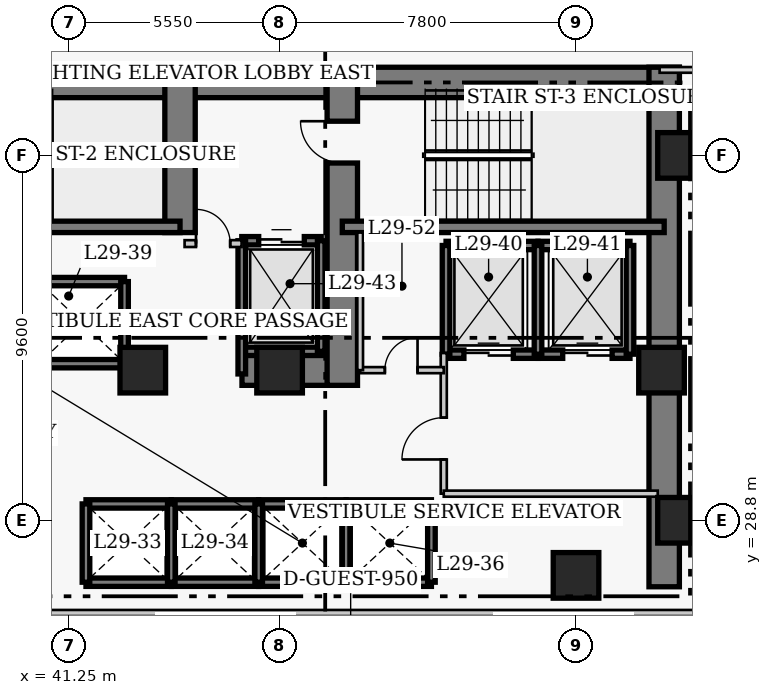
"""IFC4 building model, lengths in metres.
Left out: names, types, materials, properties, quantities, classifications, styles, units other than length and angle.
Written with IfcOpenShell. Run it as: python <this file> out.ifc"""

import sys

from ifc_helpers import new_model, si_unit, direction, frame, frame_2d, origin, origin_2d, place, context, subcontext, project, spatial, rectangle, extrude, element, fill, save


model = new_model("IFC4")
c1 = context("Model", 3, precision=1e-05, world=origin(), true_north=direction((0.0, 1.0)))
c2 = subcontext(c1, "Body", "Model", "MODEL_VIEW")
j1 = project(units=[si_unit("LENGTHUNIT", "METRE"), si_unit("PLANEANGLEUNIT", "RADIAN")], contexts=[c1])
p1 = place(None, origin())
s1 = spatial("IfcSite", under=j1, at=p1, CompositionType="ELEMENT")
p2 = place(p1, origin())
s2 = spatial("IfcBuilding", under=s1, at=p2, CompositionType="ELEMENT")
p3 = place(p2, frame((0.0, 0.0, 118.4)))
s3 = spatial("IfcBuildingStorey", under=s2, at=p3, CompositionType="ELEMENT", Elevation=118.4)
p4 = place(p3, frame((35.85, 40.32, 0.0), z_axis=(0.0, 0.0, 1.0), x_axis=(1.0, 0.0, 0.0)))
e1 = element("IfcWall", 1, at=p4, inside=s3, PredefinedType="SHEAR", context=c2, shape_type="SweptSolid", body=[
    extrude(rectangle(XDim=12.6, YDim=0.8, at=frame_2d((6.3, 0.0))), origin(), (0.0, 0.0, 1.0), 3.8),
])
p5 = place(p3, frame((48.45, 40.32, 0.0), z_axis=(0.0, 0.0, 1.0), x_axis=(1.0, 0.0, 0.0)))
e2 = element("IfcWall", 2, at=p5, inside=s3, PredefinedType="SHEAR", context=c2, shape_type="SweptSolid", body=[
    extrude(rectangle(XDim=8.87, YDim=0.8, at=frame_2d((4.435, 0.0))), origin(), (0.0, 0.0, 1.0), 3.8),
])
p6 = place(p3, frame((56.92, 27.05, 0.0), z_axis=(0.0, 0.0, 1.0), x_axis=(0.0, 1.0, 0.0)))
e3 = element("IfcWall", 3, at=p6, inside=s3, PredefinedType="SHEAR", context=c2, shape_type="SweptSolid", body=[
    extrude(rectangle(XDim=13.67, YDim=0.8, at=frame_2d((6.835, 0.0))), origin(), (0.0, 0.0, 1.0), 3.8),
])
p7 = place(p3, frame((45.81, 32.75, 0.0), z_axis=(0.0, 0.0, 1.0), x_axis=(1.0, 0.0, 0.0)))
e4 = element("IfcWall", 4, at=p7, inside=s3, PredefinedType="SHEAR", context=c2, shape_type="SweptSolid", body=[
    extrude(rectangle(XDim=2.64, YDim=0.8, at=frame_2d((1.32, 0.0))), origin(), (0.0, 0.0, 1.0), 3.8),
])
p8 = place(p3, frame((44.18, 36.37, 0.0), z_axis=(0.0, 0.0, 1.0), x_axis=(0.0, 1.0, 0.0)))
e5 = element("IfcWall", 5, at=p8, inside=s3, PredefinedType="SHEAR", context=c2, shape_type="SweptSolid", body=[
    extrude(rectangle(XDim=3.95, YDim=0.8, at=frame_2d((1.975, 0.0))), origin(), (0.0, 0.0, 1.0), 3.8),
])
p9 = place(p3, frame((48.45, 32.35, 0.0), z_axis=(0.0, 0.0, 1.0), x_axis=(0.0, 1.0, 0.0)))
e6 = element("IfcWall", 6, at=p9, inside=s3, PredefinedType="SHEAR", context=c2, shape_type="SweptSolid", body=[
    extrude(rectangle(XDim=7.97, YDim=0.8, at=frame_2d((3.985, 0.0))), origin(), (0.0, 0.0, 1.0), 3.8),
])
p10 = place(p9, frame((5.85, 0.0, 0.0)))
e7 = element("IfcOpeningElement", 7, at=p10, cuts=e6, PredefinedType="OPENING", context=c2, shape_type="SweptSolid", body=[
    extrude(rectangle(XDim=1.1, YDim=2.15, at=frame_2d((0.55, 1.075))), frame((0.0, 0.41, 0.0), z_axis=(0.0, -1.0, 0.0), x_axis=(1.0, 0.0, 0.0)), (0.0, 0.0, 1.0), 0.82),
])
p11 = place(p3, frame((35.85, 36.52, 0.0), z_axis=(0.0, 0.0, 1.0), x_axis=(1.0, 0.0, 0.0)))
e8 = element("IfcWall", 8, at=p11, inside=s3, PredefinedType="SHEAR", context=c2, shape_type="SweptSolid", body=[
    extrude(rectangle(XDim=8.33, YDim=0.3, at=frame_2d((4.165, 0.0))), origin(), (0.0, 0.0, 1.0), 3.8),
])
p12 = place(p3, frame((48.45, 36.52, 0.0), z_axis=(0.0, 0.0, 1.0), x_axis=(1.0, 0.0, 0.0)))
e9 = element("IfcWall", 9, at=p12, inside=s3, PredefinedType="SHEAR", context=c2, shape_type="SweptSolid", body=[
    extrude(rectangle(XDim=8.47, YDim=0.3, at=frame_2d((4.235, 0.0))), origin(), (0.0, 0.0, 1.0), 3.8),
])
for number, where, z_axis, x_axis in (
    (10, (57.35, 28.8, 0.0), (0.0, 0.0, 1.0), (1.0, 0.0, 0.0)),
    (11, (57.35, 38.4, 0.0), (0.0, 0.0, 1.0), (1.0, 0.0, 0.0)),
    (12, (43.2, 32.75, 0.0), (0.0, 0.0, 1.0), (1.0, 0.0, 0.0)),
    (13, (46.8, 32.75, 0.0), (0.0, 0.0, 1.0), (1.0, 0.0, 0.0)),
    (14, (54.6, 27.35, 0.0), (0.0, 0.0, 1.0), (1.0, 0.0, 0.0)),
    (15, (56.85, 32.75, 0.0), (0.0, 0.0, 1.0), (1.0, 0.0, 0.0)),
):
    element("IfcColumn", number, at=place(p3, frame(where, z_axis=z_axis, x_axis=x_axis)), inside=s3, PredefinedType="COLUMN", context=c2, shape_type="SweptSolid", body=[
        extrude(rectangle(XDim=1.2, YDim=1.2, at=origin_2d()), origin(), (0.0, 0.0, 1.0), 3.8),
    ])
for number, where, z_axis, x_axis in (
    (16, (41.705, 29.23, 0.0), (0.0, 0.0, 1.0), (1.0, 0.0, 0.0)),
    (17, (41.705, 27.17, 0.0), (0.0, 0.0, 1.0), (1.0, 0.0, 0.0)),
):
    element("IfcWall", number, at=place(p3, frame(where, z_axis=z_axis, x_axis=x_axis)), inside=s3, PredefinedType="SHEAR", context=c2, shape_type="SweptSolid", body=[
        extrude(rectangle(XDim=2.245, YDim=0.22, at=frame_2d((1.123, 0.0))), origin(), (0.0, 0.0, 1.0), 3.8),
    ])
p13 = place(p3, frame((41.705, 27.17, 0.0), z_axis=(0.0, 0.0, 1.0), x_axis=(0.0, 1.0, 0.0)))
e18 = element("IfcWall", 18, at=p13, inside=s3, PredefinedType="SHEAR", context=c2, shape_type="SweptSolid", body=[
    extrude(rectangle(XDim=2.06, YDim=0.2, at=frame_2d((1.03, 0.0))), origin(), (0.0, 0.0, 1.0), 3.8),
])
for number, where, z_axis, x_axis in (
    (19, (43.95, 29.23, 0.0), (0.0, 0.0, 1.0), (1.0, 0.0, 0.0)),
    (20, (43.95, 27.17, 0.0), (0.0, 0.0, 1.0), (1.0, 0.0, 0.0)),
):
    element("IfcWall", number, at=place(p3, frame(where, z_axis=z_axis, x_axis=x_axis)), inside=s3, PredefinedType="SHEAR", context=c2, shape_type="SweptSolid", body=[
        extrude(rectangle(XDim=2.3, YDim=0.22, at=frame_2d((1.15, 0.0))), origin(), (0.0, 0.0, 1.0), 3.8),
    ])
p14 = place(p3, frame((43.95, 27.17, 0.0), z_axis=(0.0, 0.0, 1.0), x_axis=(0.0, 1.0, 0.0)))
e21 = element("IfcWall", 21, at=p14, inside=s3, PredefinedType="SHEAR", context=c2, shape_type="SweptSolid", body=[
    extrude(rectangle(XDim=2.06, YDim=0.2, at=frame_2d((1.03, 0.0))), origin(), (0.0, 0.0, 1.0), 3.8),
])
for number, where, z_axis, x_axis in (
    (22, (46.25, 29.23, 0.0), (0.0, 0.0, 1.0), (1.0, 0.0, 0.0)),
    (23, (46.25, 27.17, 0.0), (0.0, 0.0, 1.0), (1.0, 0.0, 0.0)),
):
    element("IfcWall", number, at=place(p3, frame(where, z_axis=z_axis, x_axis=x_axis)), inside=s3, PredefinedType="SHEAR", context=c2, shape_type="SweptSolid", body=[
        extrude(rectangle(XDim=2.3, YDim=0.22, at=frame_2d((1.15, 0.0))), origin(), (0.0, 0.0, 1.0), 3.8),
    ])
p15 = place(p3, frame((46.25, 27.17, 0.0), z_axis=(0.0, 0.0, 1.0), x_axis=(0.0, 1.0, 0.0)))
e24 = element("IfcWall", 24, at=p15, inside=s3, PredefinedType="SHEAR", context=c2, shape_type="SweptSolid", body=[
    extrude(rectangle(XDim=2.06, YDim=0.2, at=frame_2d((1.03, 0.0))), origin(), (0.0, 0.0, 1.0), 3.8),
])
for number, where, z_axis, x_axis in (
    (25, (48.55, 29.23, 0.0), (0.0, 0.0, 1.0), (1.0, 0.0, 0.0)),
    (26, (48.55, 27.17, 0.0), (0.0, 0.0, 1.0), (1.0, 0.0, 0.0)),
):
    element("IfcWall", number, at=place(p3, frame(where, z_axis=z_axis, x_axis=x_axis)), inside=s3, PredefinedType="SHEAR", context=c2, shape_type="SweptSolid", body=[
        extrude(rectangle(XDim=2.245, YDim=0.22, at=frame_2d((1.123, 0.0))), origin(), (0.0, 0.0, 1.0), 3.8),
    ])
for number, where, z_axis, x_axis in (
    (27, (48.55, 27.17, 0.0), (0.0, 0.0, 1.0), (0.0, 1.0, 0.0)),
    (28, (50.795, 27.17, 0.0), (0.0, 0.0, 1.0), (0.0, 1.0, 0.0)),
):
    element("IfcWall", number, at=place(p3, frame(where, z_axis=z_axis, x_axis=x_axis)), inside=s3, PredefinedType="SHEAR", context=c2, shape_type="SweptSolid", body=[
        extrude(rectangle(XDim=2.06, YDim=0.2, at=frame_2d((1.03, 0.0))), origin(), (0.0, 0.0, 1.0), 3.8),
    ])
for number, where, z_axis, x_axis in (
    (29, (40.4, 35.08, 0.0), (0.0, 0.0, 1.0), (1.0, 0.0, 0.0)),
    (30, (40.4, 32.92, 0.0), (0.0, 0.0, 1.0), (1.0, 0.0, 0.0)),
):
    element("IfcWall", number, at=place(p3, frame(where, z_axis=z_axis, x_axis=x_axis)), inside=s3, PredefinedType="SHEAR", context=c2, shape_type="SweptSolid", body=[
        extrude(rectangle(XDim=2.32, YDim=0.22, at=frame_2d((1.16, 0.0))), origin(), (0.0, 0.0, 1.0), 3.8),
    ])
p16 = place(p3, frame((42.72, 32.92, 0.0), z_axis=(0.0, 0.0, 1.0), x_axis=(0.0, 1.0, 0.0)))
e31 = element("IfcWall", 31, at=p16, inside=s3, PredefinedType="SHEAR", context=c2, shape_type="SweptSolid", body=[
    extrude(rectangle(XDim=2.16, YDim=0.2, at=frame_2d((1.08, 0.0))), origin(), (0.0, 0.0, 1.0), 3.8),
])
p17 = place(p3, frame((51.18, 36.03, 0.0), z_axis=(0.0, 0.0, 1.0), x_axis=(1.0, 0.0, 0.0)))
e32 = element("IfcWall", 32, at=p17, inside=s3, PredefinedType="SHEAR", context=c2, shape_type="SweptSolid", body=[
    extrude(rectangle(XDim=2.42, YDim=0.22, at=frame_2d((1.21, 0.0))), origin(), (0.0, 0.0, 1.0), 3.8),
])
p18 = place(p3, frame((51.18, 33.17, 0.0), z_axis=(0.0, 0.0, 1.0), x_axis=(1.0, 0.0, 0.0)))
e33 = element("IfcWall", 33, at=p18, inside=s3, PredefinedType="SHEAR", context=c2, shape_type="SweptSolid", body=[
    extrude(rectangle(XDim=2.42, YDim=0.22, at=frame_2d((1.21, 0.0))), origin(), (0.0, 0.0, 1.0), 3.8),
])
p19 = place(p18, frame((0.47, 0.0, 0.0)))
e34 = element("IfcOpeningElement", 34, at=p19, cuts=e33, PredefinedType="OPENING", context=c2, shape_type="SweptSolid", body=[
    extrude(rectangle(XDim=1.3, YDim=2.15, at=frame_2d((0.65, 1.075))), frame((0.0, 0.12, 0.0), z_axis=(0.0, -1.0, 0.0), x_axis=(1.0, 0.0, 0.0)), (0.0, 0.0, 1.0), 0.24),
])
p20 = place(p3, frame((51.18, 33.17, 0.0), z_axis=(0.0, 0.0, 1.0), x_axis=(0.0, 1.0, 0.0)))
e35 = element("IfcWall", 35, at=p20, inside=s3, PredefinedType="SHEAR", context=c2, shape_type="SweptSolid", body=[
    extrude(rectangle(XDim=2.86, YDim=0.2, at=frame_2d((1.43, 0.0))), origin(), (0.0, 0.0, 1.0), 3.8),
])
p21 = place(p3, frame((53.6, 36.03, 0.0), z_axis=(0.0, 0.0, 1.0), x_axis=(1.0, 0.0, 0.0)))
e36 = element("IfcWall", 36, at=p21, inside=s3, PredefinedType="SHEAR", context=c2, shape_type="SweptSolid", body=[
    extrude(rectangle(XDim=2.42, YDim=0.22, at=frame_2d((1.21, 0.0))), origin(), (0.0, 0.0, 1.0), 3.8),
])
p22 = place(p3, frame((53.6, 33.17, 0.0), z_axis=(0.0, 0.0, 1.0), x_axis=(1.0, 0.0, 0.0)))
e37 = element("IfcWall", 37, at=p22, inside=s3, PredefinedType="SHEAR", context=c2, shape_type="SweptSolid", body=[
    extrude(rectangle(XDim=2.42, YDim=0.22, at=frame_2d((1.21, 0.0))), origin(), (0.0, 0.0, 1.0), 3.8),
])
p23 = place(p22, frame((0.65, 0.0, 0.0)))
e38 = element("IfcOpeningElement", 38, at=p23, cuts=e37, PredefinedType="OPENING", context=c2, shape_type="SweptSolid", body=[
    extrude(rectangle(XDim=1.3, YDim=2.15, at=frame_2d((0.65, 1.075))), frame((0.0, 0.12, 0.0), z_axis=(0.0, -1.0, 0.0), x_axis=(1.0, 0.0, 0.0)), (0.0, 0.0, 1.0), 0.24),
])
for number, where, z_axis, x_axis in (
    (39, (53.6, 33.17, 0.0), (0.0, 0.0, 1.0), (0.0, 1.0, 0.0)),
    (40, (56.02, 33.17, 0.0), (0.0, 0.0, 1.0), (0.0, 1.0, 0.0)),
):
    element("IfcWall", number, at=place(p3, frame(where, z_axis=z_axis, x_axis=x_axis)), inside=s3, PredefinedType="SHEAR", context=c2, shape_type="SweptSolid", body=[
        extrude(rectangle(XDim=2.86, YDim=0.2, at=frame_2d((1.43, 0.0))), origin(), (0.0, 0.0, 1.0), 3.8),
    ])
p24 = place(p3, frame((45.805, 36.155, 0.0), z_axis=(0.0, 0.0, 1.0), x_axis=(1.0, 0.0, 0.0)))
e41 = element("IfcWall", 41, at=p24, inside=s3, PredefinedType="SHEAR", context=c2, shape_type="SweptSolid", body=[
    extrude(rectangle(XDim=2.09, YDim=0.22, at=frame_2d((1.045, 0.0))), origin(), (0.0, 0.0, 1.0), 3.8),
])
p25 = place(p24, frame((0.445, 0.0, 0.0)))
e42 = element("IfcOpeningElement", 42, at=p25, cuts=e41, PredefinedType="OPENING", context=c2, shape_type="SweptSolid", body=[
    extrude(rectangle(XDim=1.2, YDim=2.15, at=frame_2d((0.6, 1.075))), frame((0.0, 0.12, 0.0), z_axis=(0.0, -1.0, 0.0), x_axis=(1.0, 0.0, 0.0)), (0.0, 0.0, 1.0), 0.24),
])
p26 = place(p3, frame((45.805, 33.245, 0.0), z_axis=(0.0, 0.0, 1.0), x_axis=(1.0, 0.0, 0.0)))
e43 = element("IfcWall", 43, at=p26, inside=s3, PredefinedType="SHEAR", context=c2, shape_type="SweptSolid", body=[
    extrude(rectangle(XDim=2.09, YDim=0.22, at=frame_2d((1.045, 0.0))), origin(), (0.0, 0.0, 1.0), 3.8),
])
p27 = place(p3, frame((45.805, 32.65, 0.0), z_axis=(0.0, 0.0, 1.0), x_axis=(0.0, 1.0, 0.0)))
e44 = element("IfcWall", 44, at=p27, inside=s3, PredefinedType="SHEAR", context=c2, shape_type="SweptSolid", body=[
    extrude(rectangle(XDim=3.505, YDim=0.2, at=frame_2d((1.752, 0.0))), origin(), (0.0, 0.0, 1.0), 3.8),
])
p28 = place(p3, frame((47.895, 33.245, 0.0), z_axis=(0.0, 0.0, 1.0), x_axis=(0.0, 1.0, 0.0)))
e45 = element("IfcWall", 45, at=p28, inside=s3, PredefinedType="SHEAR", context=c2, shape_type="SweptSolid", body=[
    extrude(rectangle(XDim=2.91, YDim=0.2, at=frame_2d((1.455, 0.0))), origin(), (0.0, 0.0, 1.0), 3.8),
])
p29 = place(p3, frame((44.3, 36.08, 0.0), z_axis=(0.0, 0.0, 1.0), x_axis=(1.0, 0.0, 0.0)))
e46 = element("IfcWall", 46, at=p29, inside=s3, PredefinedType="PARTITIONING", context=c2, shape_type="SweptSolid", body=[
    extrude(rectangle(XDim=1.5, YDim=0.18, at=frame_2d((0.75, 0.0))), origin(), (0.0, 0.0, 1.0), 3.54),
])
p30 = place(p29, frame((0.3, 0.0, 0.0)))
e47 = element("IfcOpeningElement", 47, at=p30, cuts=e46, PredefinedType="OPENING", context=c2, shape_type="SweptSolid", body=[
    extrude(rectangle(XDim=0.9, YDim=2.15, at=frame_2d((0.45, 1.075))), frame((0.0, 0.1, 0.0), z_axis=(0.0, -1.0, 0.0), x_axis=(1.0, 0.0, 0.0)), (0.0, 0.0, 1.0), 0.2),
])
p31 = place(p3, frame((51.12, 29.5, 0.0), z_axis=(0.0, 0.0, 1.0), x_axis=(0.0, 1.0, 0.0)))
e48 = element("IfcWall", 48, at=p31, inside=s3, PredefinedType="PARTITIONING", context=c2, shape_type="SweptSolid", body=[
    extrude(rectangle(XDim=3.7, YDim=0.16, at=frame_2d((1.85, 0.0))), origin(), (0.0, 0.0, 1.0), 3.54),
])
p32 = place(p31, frame((0.9, 0.0, 0.0)))
e49 = element("IfcOpeningElement", 49, at=p32, cuts=e48, PredefinedType="OPENING", context=c2, shape_type="SweptSolid", body=[
    extrude(rectangle(XDim=1.1, YDim=2.15, at=frame_2d((0.55, 1.075))), frame((0.0, 0.09, 0.0), z_axis=(0.0, -1.0, 0.0), x_axis=(1.0, 0.0, 0.0)), (0.0, 0.0, 1.0), 0.18),
])
p33 = place(p3, frame((51.12, 29.5, 0.0), z_axis=(0.0, 0.0, 1.0), x_axis=(1.0, 0.0, 0.0)))
e50 = element("IfcWall", 50, at=p33, inside=s3, PredefinedType="PARTITIONING", context=c2, shape_type="SweptSolid", body=[
    extrude(rectangle(XDim=5.63, YDim=0.16, at=frame_2d((2.815, 0.0))), origin(), (0.0, 0.0, 1.0), 3.54),
])
p34 = place(p3, frame((48.92, 32.75, 0.0), z_axis=(0.0, 0.0, 1.0), x_axis=(1.0, 0.0, 0.0)))
e51 = element("IfcWall", 51, at=p34, inside=s3, PredefinedType="PARTITIONING", context=c2, shape_type="SweptSolid", body=[
    extrude(rectangle(XDim=2.2, YDim=0.16, at=frame_2d((1.1, 0.0))), origin(), (0.0, 0.0, 1.0), 3.54),
])
p35 = place(p34, frame((0.65, 0.0, 0.0)))
e52 = element("IfcOpeningElement", 52, at=p35, cuts=e51, PredefinedType="OPENING", context=c2, shape_type="SweptSolid", body=[
    extrude(rectangle(XDim=0.86, YDim=2.05, at=frame_2d((0.43, 1.025))), frame((0.0, 0.09, 0.0), z_axis=(0.0, -1.0, 0.0), x_axis=(1.0, 0.0, 0.0)), (0.0, 0.0, 1.0), 0.18),
])
p36 = place(p3, frame((48.92, 32.75, 0.0), z_axis=(0.0, 0.0, 1.0), x_axis=(0.0, 1.0, 0.0)))
e53 = element("IfcWall", 53, at=p36, inside=s3, PredefinedType="PARTITIONING", context=c2, shape_type="SweptSolid", body=[
    extrude(rectangle(XDim=3.62, YDim=0.15, at=frame_2d((1.81, 0.0))), origin(), (0.0, 0.0, 1.0), 3.54),
])
p37 = place(p3, frame((35.85, 26.36, 0.0), z_axis=(0.0, 0.0, 1.0), x_axis=(1.0, 0.0, 0.0)))
e54 = element("IfcWall", 54, at=p37, inside=s3, PredefinedType="PARTITIONING", context=c2, shape_type="SweptSolid", body=[
    extrude(rectangle(XDim=22.45, YDim=0.16, at=frame_2d((11.225, 0.0))), origin(), (0.0, 0.0, 1.0), 3.54),
])
p38 = place(p3, frame((56.8, 40.65, 0.0), z_axis=(0.0, 0.0, 1.0), x_axis=(1.0, 0.0, 0.0)))
e55 = element("IfcWall", 55, at=p38, inside=s3, PredefinedType="PARTITIONING", context=c2, shape_type="SweptSolid", body=[
    extrude(rectangle(XDim=3.66, YDim=0.15, at=frame_2d((1.83, 0.0))), origin(), (0.0, 0.0, 1.0), 3.54),
])
p39 = place(p38, frame((2.05, 0.0, 0.0)))
e56 = element("IfcOpeningElement", 56, at=p39, cuts=e55, PredefinedType="OPENING", context=c2, shape_type="SweptSolid", body=[
    extrude(rectangle(XDim=1.0, YDim=2.15, at=frame_2d((0.5, 1.075))), frame((0.0, 0.085, 0.0), z_axis=(0.0, -1.0, 0.0), x_axis=(1.0, 0.0, 0.0)), (0.0, 0.0, 1.0), 0.17),
])
p40 = place(p19, origin())
e57 = element("IfcDoor", 57, at=p40, inside=s3, OperationType="DOUBLE_DOOR_SLIDING", PredefinedType="DOOR", context=c2, shape_type="SweptSolid", body=[
    extrude(rectangle(XDim=1.3, YDim=2.15, at=frame_2d((0.65, 1.075))), frame((0.0, 0.025, 0.0), z_axis=(0.0, -1.0, 0.0), x_axis=(1.0, 0.0, 0.0)), (0.0, 0.0, 1.0), 0.05),
])
fill(e34, e57)
p41 = place(p23, origin())
e58 = element("IfcDoor", 58, at=p41, inside=s3, OperationType="DOUBLE_DOOR_SLIDING", PredefinedType="DOOR", context=c2, shape_type="SweptSolid", body=[
    extrude(rectangle(XDim=1.3, YDim=2.15, at=frame_2d((0.65, 1.075))), frame((0.0, 0.025, 0.0), z_axis=(0.0, -1.0, 0.0), x_axis=(1.0, 0.0, 0.0)), (0.0, 0.0, 1.0), 0.05),
])
fill(e38, e58)
p42 = place(p25, origin())
e59 = element("IfcDoor", 59, at=p42, inside=s3, OperationType="DOUBLE_DOOR_SLIDING", PredefinedType="DOOR", context=c2, shape_type="SweptSolid", body=[
    extrude(rectangle(XDim=1.2, YDim=2.15, at=frame_2d((0.6, 1.075))), frame((0.0, 0.025, 0.0), z_axis=(0.0, -1.0, 0.0), x_axis=(1.0, 0.0, 0.0)), (0.0, 0.0, 1.0), 0.05),
])
fill(e42, e59)
p43 = place(p30, origin())
e60 = element("IfcDoor", 60, at=p43, inside=s3, OperationType="SINGLE_SWING_LEFT", PredefinedType="DOOR", context=c2, shape_type="SweptSolid", body=[
    extrude(rectangle(XDim=0.9, YDim=2.15, at=frame_2d((0.45, 1.075))), frame((0.0, 0.025, 0.0), z_axis=(0.0, -1.0, 0.0), x_axis=(1.0, 0.0, 0.0)), (0.0, 0.0, 1.0), 0.05),
])
fill(e47, e60)
p44 = place(p32, origin())
e61 = element("IfcDoor", 61, at=p44, inside=s3, OperationType="SINGLE_SWING_LEFT", PredefinedType="DOOR", context=c2, shape_type="SweptSolid", body=[
    extrude(rectangle(XDim=1.1, YDim=2.15, at=frame_2d((0.55, 1.075))), frame((0.0, 0.025, 0.0), z_axis=(0.0, -1.0, 0.0), x_axis=(1.0, 0.0, 0.0)), (0.0, 0.0, 1.0), 0.05),
])
fill(e49, e61)
p45 = place(p35, origin())
e62 = element("IfcDoor", 62, at=p45, inside=s3, OperationType="SINGLE_SWING_RIGHT", PredefinedType="DOOR", context=c2, shape_type="SweptSolid", body=[
    extrude(rectangle(XDim=0.86, YDim=2.05, at=frame_2d((0.43, 1.025))), frame((0.0, 0.025, 0.0), z_axis=(0.0, -1.0, 0.0), x_axis=(1.0, 0.0, 0.0)), (0.0, 0.0, 1.0), 0.05),
])
fill(e52, e62)
p46 = place(p10, origin())
e63 = element("IfcDoor", 63, at=p46, inside=s3, OperationType="SINGLE_SWING_RIGHT", PredefinedType="DOOR", context=c2, shape_type="SweptSolid", body=[
    extrude(rectangle(XDim=1.1, YDim=2.15, at=frame_2d((0.55, 1.075))), frame((0.0, 0.025, 0.0), z_axis=(0.0, -1.0, 0.0), x_axis=(1.0, 0.0, 0.0)), (0.0, 0.0, 1.0), 0.05),
])
fill(e7, e63)
save(model, sys.argv[1])
